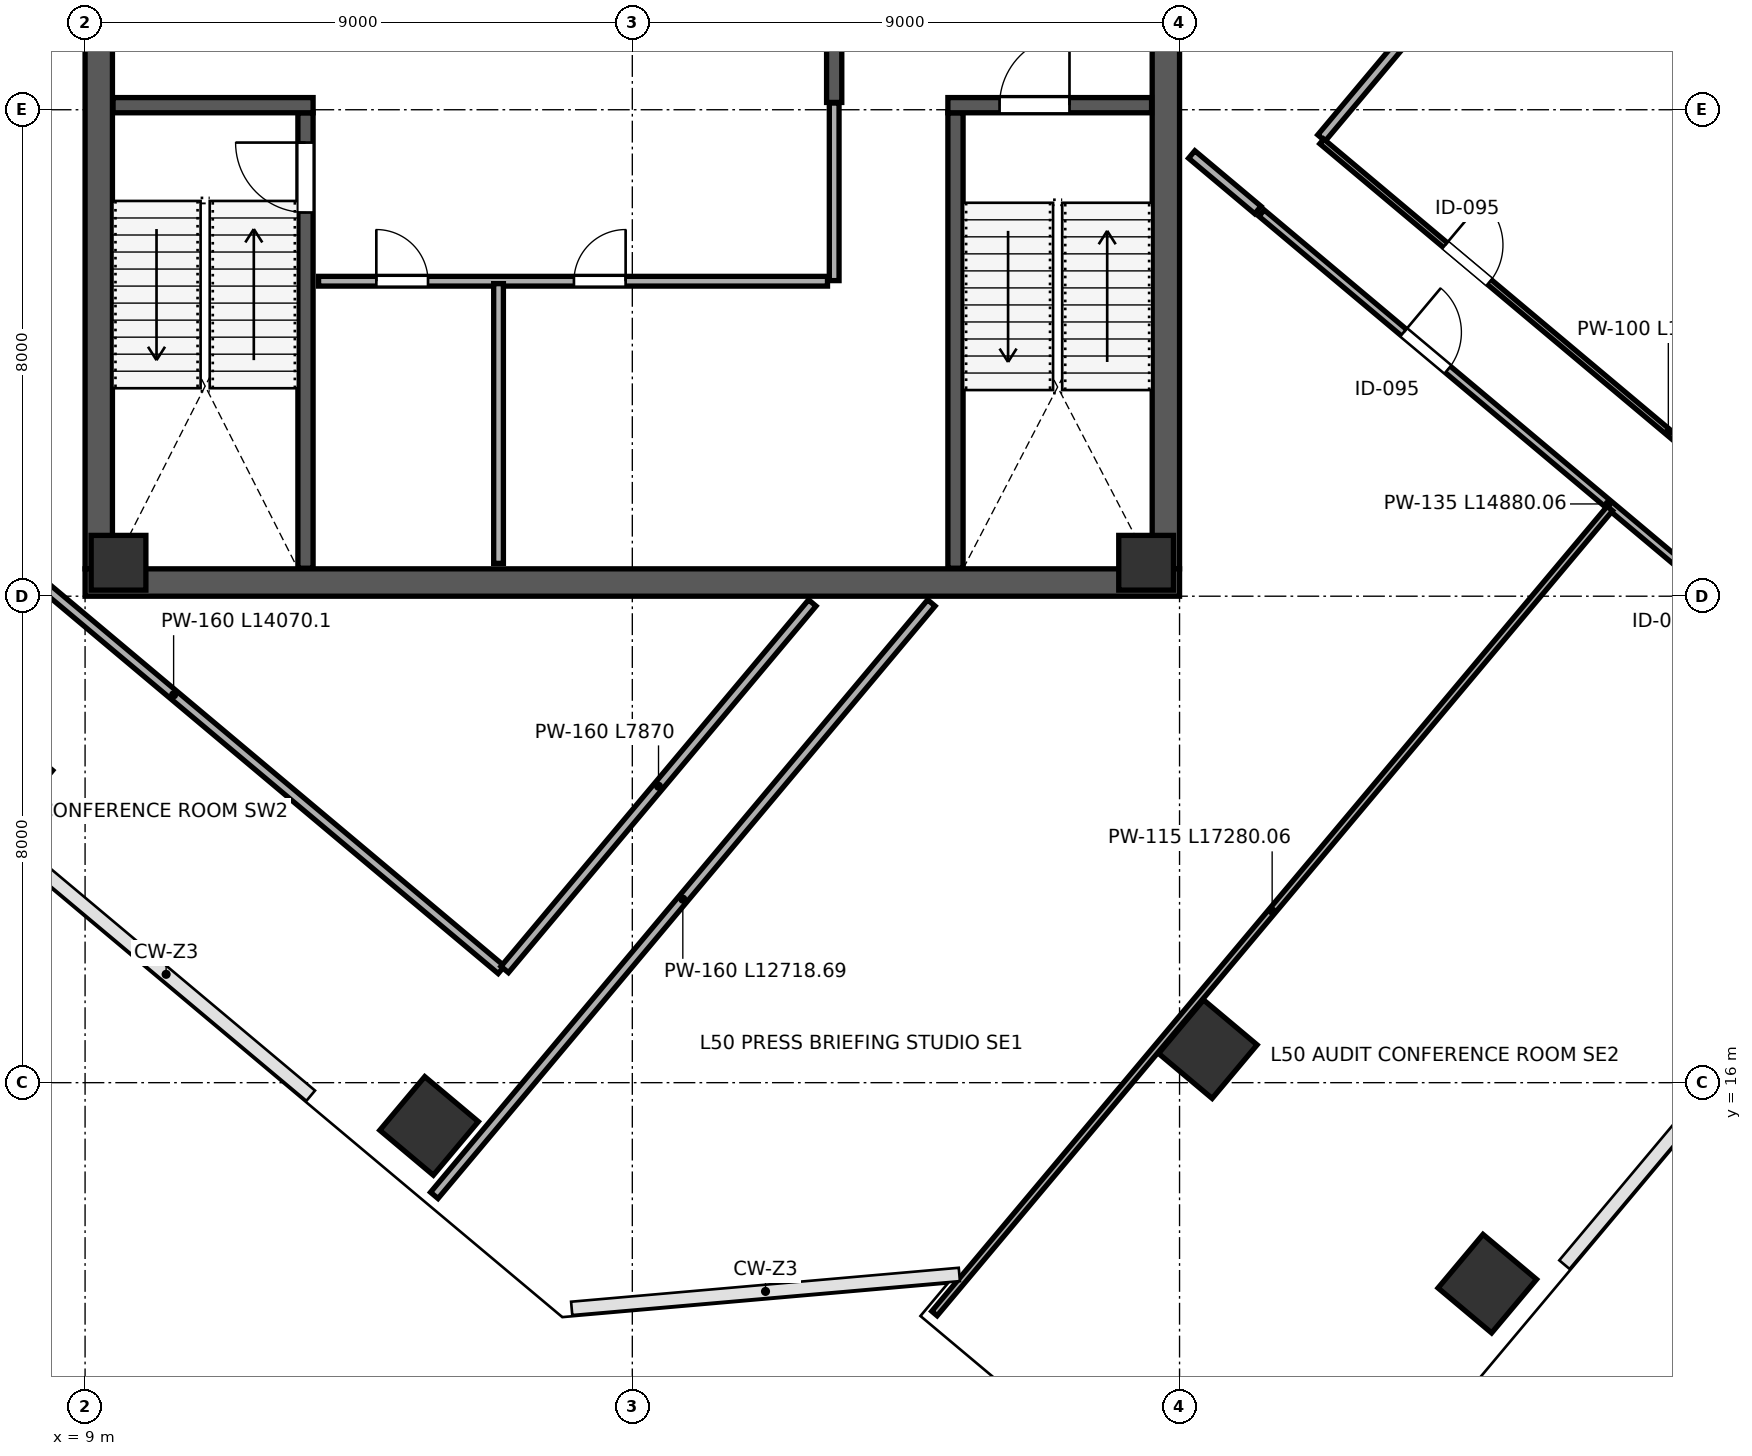
"""IFC4 building model, lengths in metres.
Left out: names, types, materials, properties, quantities, classifications, styles, units other than length and angle.
Written with IfcOpenShell. Run it as: python <this file> out.ifc"""

import sys

from ifc_helpers import new_model, si_unit, direction, frame, frame_2d, origin, origin_2d, place, context, subcontext, project, spatial, rectangle, extrude, clip, halfspace, source, transform, mapped, element, fill, save


model = new_model("IFC4")
c1 = context("Model", 3, precision=1e-05, world=origin(), true_north=direction((0.0, 1.0)))
c2 = subcontext(c1, "Body", "Model", "MODEL_VIEW")
j1 = project(units=[si_unit("LENGTHUNIT", "METRE"), si_unit("PLANEANGLEUNIT", "RADIAN")], contexts=[c1])
p1 = place(None, origin())
s1 = spatial("IfcSite", under=j1, at=p1, CompositionType="ELEMENT")
p2 = place(p1, origin())
s2 = spatial("IfcBuilding", under=s1, at=p2, CompositionType="ELEMENT")
p3 = place(p2, frame((0.0, 0.0, 224.8)))
s3 = spatial("IfcBuildingStorey", under=s2, at=p3, CompositionType="ELEMENT", Elevation=224.8)
m1 = source(origin(), c2, "Body", "SweptSolid", [
    extrude(rectangle(XDim=0.9, YDim=0.9, at=origin_2d()), origin(), (0.0, 0.0, 1.0), 4.198),
])
for number, where, z_axis, x_axis in (
    (1, (9.55, 24.55, 0.001), (0.0, 0.0, 1.0), (1.0, 0.0, 0.0)),
    (2, (26.45, 24.55, 0.001), (0.0, 0.0, 1.0), (1.0, 0.0, 0.0)),
):
    element("IfcColumn", number, at=place(p3, frame(where, z_axis=z_axis, x_axis=x_axis)), inside=s3, PredefinedType="COLUMN", context=c2, shape_type="MappedRepresentation", body=[
        mapped(m1, transform((0.0, 0.0, 0.0), scale=1.0)),
    ])
p4 = place(p3, frame((14.657, 15.289, 0.0), z_axis=(-0.169056664152, 0.073530221955, 0.982859680099), x_axis=(0.88488053523, 0.450492942198, 0.118501254847)))
e3 = element("IfcColumn", 3, at=p4, inside=s3, PredefinedType="COLUMN", context=c2, shape_type="Clipping", body=[
    clip(clip(extrude(rectangle(XDim=1.15, YDim=1.15, at=origin_2d()), origin(), (0.0, 0.0, 1.0), 4.273), halfspace(frame((0.0, 0.0, 0.153), z_axis=(0.0, 0.0, -1.0), x_axis=(1.0, 0.0, 0.0)), False)), halfspace(frame((0.0, 0.0, 4.121), z_axis=(0.0, 0.0, 1.0), x_axis=(1.0, 0.0, 0.0)), False)),
])
p5 = place(p3, frame((27.465, 16.551, 0.0), z_axis=(-0.159432457797, -0.057631711298, 0.985525178397), x_axis=(0.335336836763, 0.935774801706, 0.108971218231)))
e4 = element("IfcColumn", 4, at=p5, inside=s3, PredefinedType="COLUMN", context=c2, shape_type="Clipping", body=[
    clip(clip(extrude(rectangle(XDim=1.15, YDim=1.15, at=origin_2d()), origin(), (0.0, 0.0, 1.0), 4.262), halfspace(frame((0.0, 0.0, 0.14), z_axis=(0.0, 0.0, -1.0), x_axis=(1.0, 0.0, 0.0)), False)), halfspace(frame((0.0, 0.0, 4.122), z_axis=(0.0, 0.0, 1.0), x_axis=(1.0, 0.0, 0.0)), False)),
])
p6 = place(p3, frame((32.062, 12.695, 0.0), z_axis=(-0.197770487281, -0.102681983654, 0.97485549934), x_axis=(0.203147507847, 0.9686145337, 0.143237478199)))
e5 = element("IfcColumn", 5, at=p6, inside=s3, PredefinedType="COLUMN", context=c2, shape_type="Clipping", body=[
    clip(clip(extrude(rectangle(XDim=1.15, YDim=1.15, at=origin_2d()), origin(), (0.0, 0.0, 1.0), 4.308), halfspace(frame((0.0, 0.0, 0.186), z_axis=(0.0, 0.0, -1.0), x_axis=(1.0, 0.0, 0.0)), False)), halfspace(frame((0.0, 0.0, 4.122), z_axis=(0.0, 0.0, 1.0), x_axis=(1.0, 0.0, 0.0)), False)),
])
p7 = place(p3, frame((9.225, 24.45, 0.0), z_axis=(0.0, 0.0, 1.0), x_axis=(0.0, 1.0, 0.0)))
e6 = element("IfcWall", 6, at=p7, inside=s3, PredefinedType="SHEAR", context=c2, shape_type="SweptSolid", body=[
    extrude(rectangle(XDim=15.1, YDim=0.45, at=frame_2d((7.55, 0.0))), origin(), (0.0, 0.0, 1.0), 3.96),
])
p8 = place(p7, frame((8.7, 0.0, 0.0)))
e7 = element("IfcOpeningElement", 7, at=p8, cuts=e6, PredefinedType="OPENING", context=c2, shape_type="SweptSolid", body=[
    extrude(rectangle(XDim=1.15, YDim=2.2, at=frame_2d((0.575, 1.1))), frame((0.0, 0.235, 0.0), z_axis=(0.0, -1.0, 0.0), x_axis=(1.0, 0.0, 0.0)), (0.0, 0.0, 1.0), 0.47),
])
p9 = place(p3, frame((26.775, 24.45, 0.0), z_axis=(0.0, 0.0, 1.0), x_axis=(0.0, 1.0, 0.0)))
e8 = element("IfcWall", 8, at=p9, inside=s3, PredefinedType="SHEAR", context=c2, shape_type="SweptSolid", body=[
    extrude(rectangle(XDim=15.1, YDim=0.45, at=frame_2d((7.55, 0.0))), origin(), (0.0, 0.0, 1.0), 3.96),
])
p10 = place(p9, frame((8.6, 0.0, 0.0)))
e9 = element("IfcOpeningElement", 9, at=p10, cuts=e8, PredefinedType="OPENING", context=c2, shape_type="SweptSolid", body=[
    extrude(rectangle(XDim=1.15, YDim=2.2, at=frame_2d((0.575, 1.1))), frame((0.0, 0.235, 0.0), z_axis=(0.0, -1.0, 0.0), x_axis=(1.0, 0.0, 0.0)), (0.0, 0.0, 1.0), 0.47),
])
p11 = place(p3, frame((9.0, 24.225, 0.0), z_axis=(0.0, 0.0, 1.0), x_axis=(1.0, 0.0, 0.0)))
e10 = element("IfcWall", 10, at=p11, inside=s3, PredefinedType="SHEAR", context=c2, shape_type="SweptSolid", body=[
    extrude(rectangle(XDim=18.0, YDim=0.45, at=frame_2d((9.0, 0.0))), origin(), (0.0, 0.0, 1.0), 3.96),
])
p12 = place(p3, frame((12.625, 24.46, 0.0), z_axis=(0.0, 0.0, 1.0), x_axis=(0.0, 1.0, 0.0)))
e11 = element("IfcWall", 11, at=p12, inside=s3, PredefinedType="SHEAR", context=c2, shape_type="SweptSolid", body=[
    extrude(rectangle(XDim=7.49, YDim=0.25, at=frame_2d((3.745, 0.0))), origin(), (0.0, 0.0, 1.0), 3.96),
])
p13 = place(p12, frame((5.85, 0.0, 0.0)))
e12 = element("IfcOpeningElement", 12, at=p13, cuts=e11, PredefinedType="OPENING", context=c2, shape_type="SweptSolid", body=[
    extrude(rectangle(XDim=1.15, YDim=2.2, at=frame_2d((0.575, 1.1))), frame((0.0, 0.135, 0.0), z_axis=(0.0, -1.0, 0.0), x_axis=(1.0, 0.0, 0.0)), (0.0, 0.0, 1.0), 0.27),
])
p14 = place(p3, frame((9.46, 32.075, 0.0), z_axis=(0.0, 0.0, 1.0), x_axis=(1.0, 0.0, 0.0)))
e13 = element("IfcWall", 13, at=p14, inside=s3, PredefinedType="SHEAR", context=c2, shape_type="SweptSolid", body=[
    extrude(rectangle(XDim=3.29, YDim=0.25, at=frame_2d((1.645, 0.0))), origin(), (0.0, 0.0, 1.0), 3.96),
])
p15 = place(p3, frame((23.315, 24.46, 0.0), z_axis=(0.0, 0.0, 1.0), x_axis=(0.0, 1.0, 0.0)))
e14 = element("IfcWall", 14, at=p15, inside=s3, PredefinedType="SHEAR", context=c2, shape_type="SweptSolid", body=[
    extrude(rectangle(XDim=7.49, YDim=0.25, at=frame_2d((3.745, 0.0))), origin(), (0.0, 0.0, 1.0), 3.96),
])
p16 = place(p3, frame((23.19, 32.075, 0.0), z_axis=(0.0, 0.0, 1.0), x_axis=(1.0, 0.0, 0.0)))
e15 = element("IfcWall", 15, at=p16, inside=s3, PredefinedType="SHEAR", context=c2, shape_type="SweptSolid", body=[
    extrude(rectangle(XDim=3.35, YDim=0.25, at=frame_2d((1.675, 0.0))), origin(), (0.0, 0.0, 1.0), 3.96),
])
p17 = place(p16, frame((0.85, 0.0, 0.0)))
e16 = element("IfcOpeningElement", 16, at=p17, cuts=e15, PredefinedType="OPENING", context=c2, shape_type="SweptSolid", body=[
    extrude(rectangle(XDim=1.15, YDim=2.2, at=frame_2d((0.575, 1.1))), frame((0.0, 0.135, 0.0), z_axis=(0.0, -1.0, 0.0), x_axis=(1.0, 0.0, 0.0)), (0.0, 0.0, 1.0), 0.27),
])
p18 = place(p3, frame((21.32, 32.12, 0.0), z_axis=(0.0, 0.0, 1.0), x_axis=(0.0, 1.0, 0.0)))
e17 = element("IfcWall", 17, at=p18, inside=s3, PredefinedType="SHEAR", context=c2, shape_type="SweptSolid", body=[
    extrude(rectangle(XDim=7.42, YDim=0.25, at=frame_2d((3.71, 0.0))), origin(), (0.0, 0.0, 1.0), 3.96),
])
p19 = place(p18, frame((1.4, 0.0, 0.0)))
e18 = element("IfcOpeningElement", 18, at=p19, cuts=e17, PredefinedType="OPENING", context=c2, shape_type="SweptSolid", body=[
    extrude(rectangle(XDim=1.15, YDim=2.2, at=frame_2d((0.575, 1.1))), frame((0.0, 0.135, 0.0), z_axis=(0.0, -1.0, 0.0), x_axis=(1.0, 0.0, 0.0)), (0.0, 0.0, 1.0), 0.27),
])
p20 = place(p3, frame((12.84, 29.18, 0.0), z_axis=(0.0, 0.0, 1.0), x_axis=(1.0, 0.0, 0.0)))
e19 = element("IfcWall", 19, at=p20, inside=s3, PredefinedType="PARTITIONING", context=c2, shape_type="SweptSolid", body=[
    extrude(rectangle(XDim=8.37, YDim=0.16, at=frame_2d((4.185, 0.0))), origin(), (0.0, 0.0, 1.0), 3.96),
])
p21 = place(p20, frame((0.95, 0.0, 0.0)))
e20 = element("IfcOpeningElement", 20, at=p21, cuts=e19, PredefinedType="OPENING", context=c2, shape_type="SweptSolid", body=[
    extrude(rectangle(XDim=0.85, YDim=2.1, at=frame_2d((0.425, 1.05))), frame((0.0, 0.09, 0.0), z_axis=(0.0, -1.0, 0.0), x_axis=(1.0, 0.0, 0.0)), (0.0, 0.0, 1.0), 0.18),
])
p22 = place(p20, frame((4.2, 0.0, 0.0)))
e21 = element("IfcOpeningElement", 21, at=p22, cuts=e19, PredefinedType="OPENING", context=c2, shape_type="SweptSolid", body=[
    extrude(rectangle(XDim=0.85, YDim=2.1, at=frame_2d((0.425, 1.05))), frame((0.0, 0.09, 0.0), z_axis=(0.0, -1.0, 0.0), x_axis=(1.0, 0.0, 0.0)), (0.0, 0.0, 1.0), 0.18),
])
p23 = place(p3, frame((15.8, 24.54, 0.0), z_axis=(0.0, 0.0, 1.0), x_axis=(0.0, 1.0, 0.0)))
e22 = element("IfcWall", 22, at=p23, inside=s3, PredefinedType="PARTITIONING", context=c2, shape_type="SweptSolid", body=[
    extrude(rectangle(XDim=4.6, YDim=0.16, at=frame_2d((2.3, 0.0))), origin(), (0.0, 0.0, 1.0), 3.96),
])
p24 = place(p3, frame((21.32, 29.19, 0.0), z_axis=(0.0, 0.0, 1.0), x_axis=(0.0, 1.0, 0.0)))
e23 = element("IfcWall", 23, at=p24, inside=s3, PredefinedType="PARTITIONING", context=c2, shape_type="SweptSolid", body=[
    extrude(rectangle(XDim=2.92, YDim=0.16, at=frame_2d((1.46, 0.0))), origin(), (0.0, 0.0, 1.0), 3.96),
])
p25 = place(p3, frame((5.067, 26.9, 0.0), z_axis=(0.0, 0.0, 1.0), x_axis=(0.766049317662, -0.642781800387, 0.0)))
e24 = element("IfcWall", 24, at=p25, inside=s3, PredefinedType="PARTITIONING", context=c2, shape_type="SweptSolid", body=[
    extrude(rectangle(XDim=14.07, YDim=0.16, at=frame_2d((7.035, 0.0))), origin(), (0.0, 0.0, 1.0), 3.96),
])
p26 = place(p25, frame((1.15, 0.0, 0.0)))
e25 = element("IfcOpeningElement", 25, at=p26, cuts=e24, PredefinedType="OPENING", context=c2, shape_type="SweptSolid", body=[
    extrude(rectangle(XDim=0.95, YDim=2.15, at=frame_2d((0.475, 1.075))), frame((0.0, 0.09, 0.0), z_axis=(0.0, -1.0, 0.0), x_axis=(1.0, 0.0, 0.0)), (0.0, 0.0, 1.0), 0.18),
])
p27 = place(p3, frame((15.902, 17.861, 0.0), z_axis=(0.0, 0.0, 1.0), x_axis=(0.642774387864, 0.766055537351, 0.0)))
e26 = element("IfcWall", 26, at=p27, inside=s3, PredefinedType="PARTITIONING", context=c2, shape_type="SweptSolid", body=[
    extrude(rectangle(XDim=7.87, YDim=0.16, at=frame_2d((3.935, 0.0))), origin(), (0.0, 0.0, 1.0), 3.96),
])
p28 = place(p3, frame((27.2, 31.264, 0.0), z_axis=(0.0, 0.0, 1.0), x_axis=(0.766046809659, -0.642784789344, 0.0)))
e27 = element("IfcWall", 27, at=p28, inside=s3, PredefinedType="PARTITIONING", context=c2, shape_type="SweptSolid", body=[
    extrude(rectangle(XDim=1.42, YDim=0.16, at=frame_2d((0.71, 0.0))), origin(), (0.0, 0.0, 1.0), 3.96),
])
p29 = place(p3, frame((0.894, 32.412, 0.0), z_axis=(0.0, 0.0, 1.0), x_axis=(0.642782006196, 0.766049144971, 0.0)))
e28 = element("IfcWall", 28, at=p29, inside=s3, PredefinedType="PARTITIONING", context=c2, shape_type="SweptSolid", body=[
    extrude(rectangle(XDim=28.95, YDim=0.1, at=frame_2d((14.475, 0.0))), origin(), (0.0, 0.0, 1.0), 3.96),
])
p30 = place(p29, frame((2.2, 0.0, 0.0)))
e29 = element("IfcOpeningElement", 29, at=p30, cuts=e28, PredefinedType="OPENING", context=c2, shape_type="SweptSolid", body=[
    extrude(rectangle(XDim=0.95, YDim=2.15, at=frame_2d((0.475, 1.075))), frame((0.0, 0.06, 0.0), z_axis=(0.0, -1.0, 0.0), x_axis=(1.0, 0.0, 0.0)), (0.0, 0.0, 1.0), 0.12),
])
p31 = place(p3, frame((29.334, 31.535, 0.0), z_axis=(0.0, 0.0, 1.0), x_axis=(0.642789592208, 0.766042779581, 0.0)))
e30 = element("IfcWall", 30, at=p31, inside=s3, PredefinedType="PARTITIONING", context=c2, shape_type="SweptSolid", body=[
    extrude(rectangle(XDim=11.34, YDim=0.16, at=frame_2d((5.67, 0.0))), origin(), (0.0, 0.0, 1.0), 3.195),
])
p32 = place(p3, frame((14.743, 14.146, 0.0), z_axis=(0.0, 0.0, 1.0), x_axis=(0.642789996784, 0.7660424401, 0.0)))
e31 = element("IfcWall", 31, at=p32, inside=s3, PredefinedType="PARTITIONING", context=c2, shape_type="SweptSolid", body=[
    extrude(rectangle(XDim=12.719, YDim=0.16, at=frame_2d((6.359, 0.0))), origin(), (0.0, 0.0, 1.0), 3.96),
])
p33 = place(p3, frame((29.339, 31.479, 0.0), z_axis=(0.0, 0.0, 1.0), x_axis=(0.766048981681, -0.6427822008, 0.0)))
e32 = element("IfcWall", 32, at=p33, inside=s3, PredefinedType="PARTITIONING", context=c2, shape_type="SweptSolid", body=[
    extrude(rectangle(XDim=14.88, YDim=0.1, at=frame_2d((7.44, 0.0))), origin(), (0.0, 0.0, 1.0), 3.96),
])
p34 = place(p33, frame((2.65, 0.0, 0.0)))
e33 = element("IfcOpeningElement", 33, at=p34, cuts=e32, PredefinedType="OPENING", context=c2, shape_type="SweptSolid", body=[
    extrude(rectangle(XDim=0.95, YDim=2.15, at=frame_2d((0.475, 1.075))), frame((0.0, 0.06, 0.0), z_axis=(0.0, -1.0, 0.0), x_axis=(1.0, 0.0, 0.0)), (0.0, 0.0, 1.0), 0.12),
])
p35 = place(p3, frame((28.349, 30.3, 0.0), z_axis=(0.0, 0.0, 1.0), x_axis=(0.766042202636, -0.642790279781, 0.0)))
e34 = element("IfcWall", 34, at=p35, inside=s3, PredefinedType="PARTITIONING", context=c2, shape_type="SweptSolid", body=[
    extrude(rectangle(XDim=14.88, YDim=0.135, at=frame_2d((7.44, 0.0))), origin(), (0.0, 0.0, 1.0), 3.96),
])
p36 = place(p35, frame((3.05, 0.0, 0.0)))
e35 = element("IfcOpeningElement", 35, at=p36, cuts=e34, PredefinedType="OPENING", context=c2, shape_type="SweptSolid", body=[
    extrude(rectangle(XDim=0.95, YDim=2.15, at=frame_2d((0.475, 1.075))), frame((0.0, 0.078, 0.0), z_axis=(0.0, -1.0, 0.0), x_axis=(1.0, 0.0, 0.0)), (0.0, 0.0, 1.0), 0.155),
])
p37 = place(p35, frame((9.0, 0.0, 0.0)))
e36 = element("IfcOpeningElement", 36, at=p37, cuts=e34, PredefinedType="OPENING", context=c2, shape_type="SweptSolid", body=[
    extrude(rectangle(XDim=0.95, YDim=2.15, at=frame_2d((0.475, 1.075))), frame((0.0, 0.078, 0.0), z_axis=(0.0, -1.0, 0.0), x_axis=(1.0, 0.0, 0.0)), (0.0, 0.0, 1.0), 0.155),
])
p38 = place(p3, frame((22.969, 12.204, 0.0), z_axis=(0.0, 0.0, 1.0), x_axis=(0.642787758903, 0.766044317912, 0.0)))
e37 = element("IfcWall", 37, at=p38, inside=s3, PredefinedType="PARTITIONING", context=c2, shape_type="SweptSolid", body=[
    extrude(rectangle(XDim=17.28, YDim=0.115, at=frame_2d((8.64, 0.0))), origin(), (0.0, 0.0, 1.0), 3.96),
])
m2 = source(origin(), c2, "Body", "SweptSolid", [
    extrude(rectangle(XDim=1.15, YDim=2.2, at=frame_2d((0.575, 1.1))), frame((0.0, 0.025, 0.0), z_axis=(0.0, -1.0, 0.0), x_axis=(1.0, 0.0, 0.0)), (0.0, 0.0, 1.0), 0.05),
])
p39 = place(p13, origin())
e38 = element("IfcDoor", 38, at=p39, inside=s3, OperationType="SINGLE_SWING_RIGHT", PredefinedType="DOOR", context=c2, shape_type="MappedRepresentation", body=[
    mapped(m2, transform((0.0, 0.0, 0.0), scale=1.0)),
])
fill(e12, e38)
p40 = place(p17, origin())
e39 = element("IfcDoor", 39, at=p40, inside=s3, OperationType="SINGLE_SWING_RIGHT", PredefinedType="DOOR", context=c2, shape_type="MappedRepresentation", body=[
    mapped(m2, transform((0.0, 0.0, 0.0), scale=1.0)),
])
fill(e16, e39)
m3 = source(origin(), c2, "Body", "SweptSolid", [
    extrude(rectangle(XDim=0.85, YDim=2.1, at=frame_2d((0.425, 1.05))), frame((0.0, 0.025, 0.0), z_axis=(0.0, -1.0, 0.0), x_axis=(1.0, 0.0, 0.0)), (0.0, 0.0, 1.0), 0.05),
])
p41 = place(p21, origin())
e40 = element("IfcDoor", 40, at=p41, inside=s3, OperationType="SINGLE_SWING_LEFT", PredefinedType="DOOR", context=c2, shape_type="MappedRepresentation", body=[
    mapped(m3, transform((0.0, 0.0, 0.0), scale=1.0)),
])
fill(e20, e40)
p42 = place(p22, origin())
e41 = element("IfcDoor", 41, at=p42, inside=s3, OperationType="SINGLE_SWING_RIGHT", PredefinedType="DOOR", context=c2, shape_type="MappedRepresentation", body=[
    mapped(m3, transform((0.0, 0.0, 0.0), scale=1.0)),
])
fill(e21, e41)
m4 = source(origin(), c2, "Body", "SweptSolid", [
    extrude(rectangle(XDim=0.95, YDim=2.15, at=frame_2d((0.475, 1.075))), frame((0.0, 0.025, 0.0), z_axis=(0.0, -1.0, 0.0), x_axis=(1.0, 0.0, 0.0)), (0.0, 0.0, 1.0), 0.05),
])
p43 = place(p34, origin())
e42 = element("IfcDoor", 42, at=p43, inside=s3, OperationType="SINGLE_SWING_LEFT", PredefinedType="DOOR", context=c2, shape_type="MappedRepresentation", body=[
    mapped(m4, transform((0.0, 0.0, 0.0), scale=1.0)),
])
fill(e33, e42)
p44 = place(p36, origin())
e43 = element("IfcDoor", 43, at=p44, inside=s3, OperationType="SINGLE_SWING_LEFT", PredefinedType="DOOR", context=c2, shape_type="MappedRepresentation", body=[
    mapped(m4, transform((0.0, 0.0, 0.0), scale=1.0)),
])
fill(e35, e43)
save(model, sys.argv[1])
